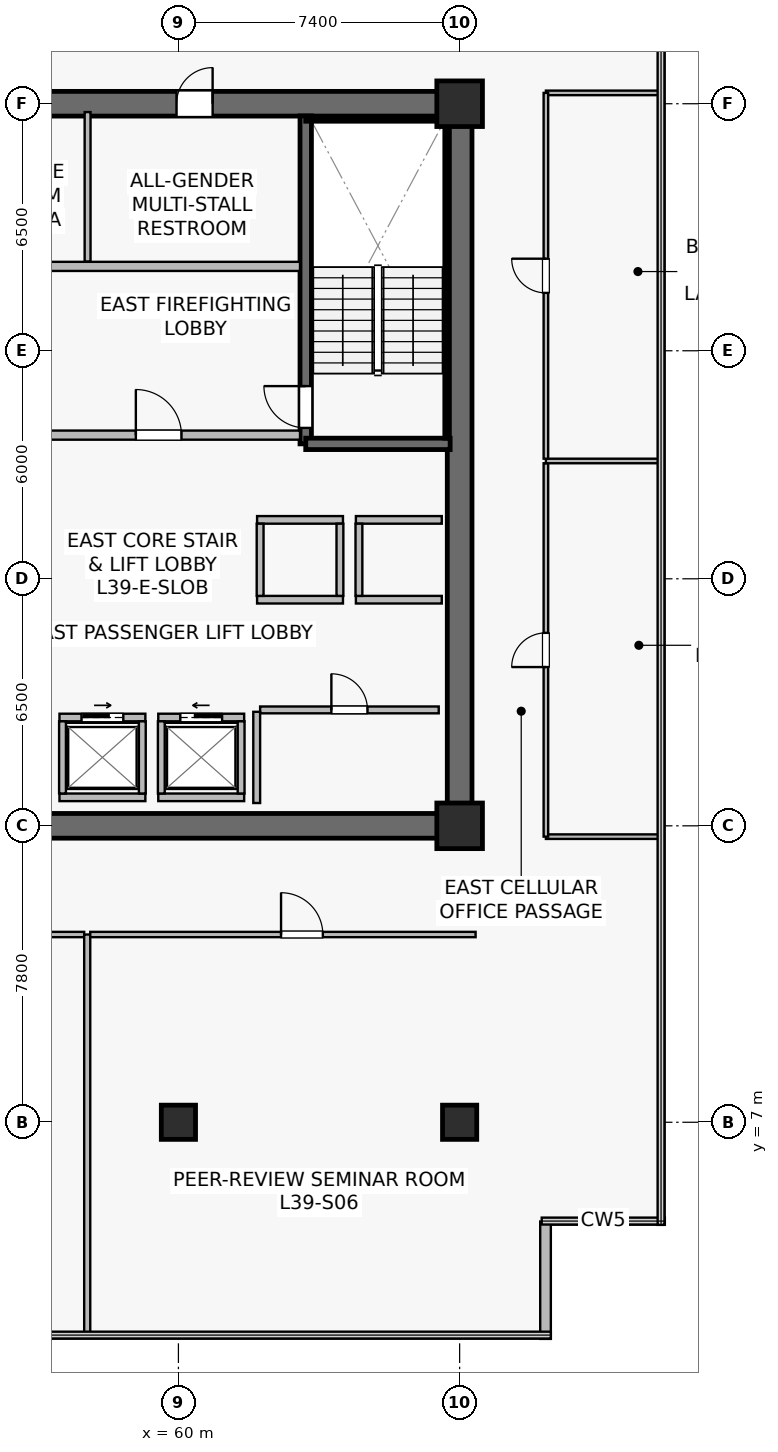
"""IFC4 building model, lengths in metres.
Left out: names, types, materials, properties, quantities, classifications, styles, units other than length and angle.
Written with IfcOpenShell. Run it as: python <this file> out.ifc"""

import sys

from ifc_helpers import new_model, si_unit, direction, frame, frame_2d, origin, origin_2d, place, context, subcontext, project, spatial, rectangle, extrude, source, transform, mapped, element, fill, save


model = new_model("IFC4")
c1 = context("Model", 3, precision=1e-05, world=origin(), true_north=direction((0.0, 1.0)))
c2 = subcontext(c1, "Body", "Model", "MODEL_VIEW")
j1 = project(units=[si_unit("LENGTHUNIT", "METRE"), si_unit("PLANEANGLEUNIT", "RADIAN")], contexts=[c1])
p1 = place(None, origin())
s1 = spatial("IfcSite", under=j1, at=p1, CompositionType="ELEMENT")
p2 = place(p1, origin())
s2 = spatial("IfcBuilding", under=s1, at=p2, CompositionType="ELEMENT")
p3 = place(p2, frame((0.0, 0.0, 162.5)))
s3 = spatial("IfcBuildingStorey", under=s2, at=p3, CompositionType="ELEMENT", Elevation=162.5)
p4 = place(p3, frame((52.275, 14.8, 0.0), z_axis=(0.0, 0.0, 1.0), x_axis=(1.0, 0.0, 0.0)))
e1 = element("IfcWall", 1, at=p4, inside=s3, PredefinedType="SHEAR", context=c2, shape_type="SweptSolid", body=[
    extrude(rectangle(XDim=15.45, YDim=0.65, at=frame_2d((7.725, 0.0))), origin(), (0.0, 0.0, 1.0), 3.79),
])
p5 = place(p3, frame((52.275, 33.8, 0.0), z_axis=(0.0, 0.0, 1.0), x_axis=(1.0, 0.0, 0.0)))
e2 = element("IfcWall", 2, at=p5, inside=s3, PredefinedType="SHEAR", context=c2, shape_type="SweptSolid", body=[
    extrude(rectangle(XDim=15.45, YDim=0.65, at=frame_2d((7.725, 0.0))), origin(), (0.0, 0.0, 1.0), 3.79),
])
p6 = place(p5, frame((7.675, 0.0, 0.0)))
e3 = element("IfcOpeningElement", 3, at=p6, cuts=e2, PredefinedType="OPENING", context=c2, shape_type="SweptSolid", body=[
    extrude(rectangle(XDim=0.95, YDim=2.15, at=frame_2d((0.475, 1.075))), frame((0.0, 0.335, 0.0), z_axis=(0.0, -1.0, 0.0), x_axis=(1.0, 0.0, 0.0)), (0.0, 0.0, 1.0), 0.67),
])
p7 = place(p5, frame((2.61, 0.0, 0.0)))
e4 = element("IfcOpeningElement", 4, at=p7, cuts=e2, PredefinedType="OPENING", context=c2, shape_type="SweptSolid", body=[
    extrude(rectangle(XDim=0.95, YDim=2.15, at=frame_2d((0.475, 1.075))), frame((0.0, 0.335, 0.0), z_axis=(0.0, -1.0, 0.0), x_axis=(1.0, 0.0, 0.0)), (0.0, 0.0, 1.0), 0.67),
])
p8 = place(p3, frame((67.4, 15.125, 0.0), z_axis=(0.0, 0.0, 1.0), x_axis=(0.0, 1.0, 0.0)))
e5 = element("IfcWall", 5, at=p8, inside=s3, PredefinedType="SHEAR", context=c2, shape_type="SweptSolid", body=[
    extrude(rectangle(XDim=18.35, YDim=0.65, at=frame_2d((9.175, 0.0))), origin(), (0.0, 0.0, 1.0), 3.79),
])
p9 = place(p3, frame((63.35, 24.85, 0.0), z_axis=(0.0, 0.0, 1.0), x_axis=(0.0, 1.0, 0.0)))
e6 = element("IfcWall", 6, at=p9, inside=s3, PredefinedType="SHEAR", context=c2, shape_type="SweptSolid", body=[
    extrude(rectangle(XDim=8.63, YDim=0.3, at=frame_2d((4.315, 0.0))), origin(), (0.0, 0.0, 1.0), 3.79),
])
p10 = place(p9, frame((0.42, 0.0, 0.0)))
e7 = element("IfcOpeningElement", 7, at=p10, cuts=e6, PredefinedType="OPENING", context=c2, shape_type="SweptSolid", body=[
    extrude(rectangle(XDim=1.1, YDim=2.15, at=frame_2d((0.55, 1.075))), frame((0.0, 0.16, 0.0), z_axis=(0.0, -1.0, 0.0), x_axis=(1.0, 0.0, 0.0)), (0.0, 0.0, 1.0), 0.32),
])
p11 = place(p3, frame((63.35, 24.85, 0.0), z_axis=(0.0, 0.0, 1.0), x_axis=(1.0, 0.0, 0.0)))
e8 = element("IfcWall", 8, at=p11, inside=s3, PredefinedType="SHEAR", context=c2, shape_type="SweptSolid", body=[
    extrude(rectangle(XDim=3.8, YDim=0.3, at=frame_2d((1.9, 0.0))), origin(), (0.0, 0.0, 1.0), 3.79),
])
p12 = place(p3, frame((63.35, 33.4, 0.0), z_axis=(0.0, 0.0, 1.0), x_axis=(1.0, 0.0, 0.0)))
e9 = element("IfcWall", 9, at=p12, inside=s3, PredefinedType="SOLIDWALL", context=c2, shape_type="SweptSolid", body=[
    extrude(rectangle(XDim=3.72, YDim=0.12, at=frame_2d((1.86, 0.0))), origin(), (0.0, 0.0, 1.0), 3.79),
])
p13 = place(p3, frame((67.07, 25.0, 0.0), z_axis=(0.0, 0.0, 1.0), x_axis=(0.0, 1.0, 0.0)))
e10 = element("IfcWall", 10, at=p13, inside=s3, PredefinedType="SOLIDWALL", context=c2, shape_type="SweptSolid", body=[
    extrude(rectangle(XDim=8.32, YDim=0.12, at=frame_2d((4.16, 0.0))), origin(), (0.0, 0.0, 1.0), 3.79),
])
m1 = source(origin(), c2, "Body", "SweptSolid", [
    extrude(rectangle(XDim=0.9, YDim=0.9, at=origin_2d()), origin(), (0.0, 0.0, 1.0), 4.1),
])
p14 = place(p3, frame((60.0, 7.0, 0.0), z_axis=(0.0, 0.0, 1.0), x_axis=(1.0, 0.0, 0.0)))
e11 = element("IfcColumn", 11, at=p14, inside=s3, PredefinedType="COLUMN", context=c2, shape_type="MappedRepresentation", body=[
    mapped(m1, transform((0.0, 0.0, 0.0), scale=1.0)),
])
m2 = source(origin(), c2, "Body", "SweptSolid", [
    extrude(rectangle(XDim=1.2, YDim=1.2, at=origin_2d()), origin(), (0.0, 0.0, 1.0), 4.1),
])
for number, where, z_axis, x_axis in (
    (12, (67.4, 14.8, 0.0), (0.0, 0.0, 1.0), (1.0, 0.0, 0.0)),
    (13, (67.4, 33.8, 0.0), (0.0, 0.0, 1.0), (1.0, 0.0, 0.0)),
):
    element("IfcColumn", number, at=place(p3, frame(where, z_axis=z_axis, x_axis=x_axis)), inside=s3, PredefinedType="COLUMN", context=c2, shape_type="MappedRepresentation", body=[
        mapped(m2, transform((0.0, 0.0, 0.0), scale=1.0)),
    ])
p15 = place(p3, frame((67.4, 7.0, 0.0), z_axis=(0.0, 0.0, 1.0), x_axis=(1.0, 0.0, 0.0)))
e14 = element("IfcColumn", 14, at=p15, inside=s3, PredefinedType="COLUMN", context=c2, shape_type="MappedRepresentation", body=[
    mapped(m1, transform((0.0, 0.0, 0.0), scale=1.0)),
])
p16 = place(p3, frame((69.66, 1.3, 0.0), z_axis=(0.0, 0.0, 1.0), x_axis=(0.0, 1.0, 0.0)))
e15 = element("IfcWall", 15, at=p16, inside=s3, PredefinedType="STANDARD", context=c2, shape_type="SweptSolid", body=[
    extrude(rectangle(XDim=3.088, YDim=0.28, at=frame_2d((1.544, 0.0))), origin(), (0.0, 0.0, 1.0), 3.79),
])
p17 = place(p3, frame((56.28, 25.08, 0.0), z_axis=(0.0, 0.0, 1.0), x_axis=(1.0, 0.0, 0.0)))
e16 = element("IfcWall", 16, at=p17, inside=s3, PredefinedType="SOLIDWALL", context=c2, shape_type="SweptSolid", body=[
    extrude(rectangle(XDim=6.92, YDim=0.24, at=frame_2d((3.46, 0.0))), origin(), (0.0, 0.0, 1.0), 3.187),
])
p18 = place(p17, frame((2.6, 0.0, 0.0)))
e17 = element("IfcOpeningElement", 17, at=p18, cuts=e16, PredefinedType="OPENING", context=c2, shape_type="SweptSolid", body=[
    extrude(rectangle(XDim=1.2, YDim=2.16, at=frame_2d((0.6, 1.08))), frame((0.0, 0.13, 0.0), z_axis=(0.0, -1.0, 0.0), x_axis=(1.0, 0.0, 0.0)), (0.0, 0.0, 1.0), 0.26),
])
p19 = place(p3, frame((56.28, 29.52, 0.0), z_axis=(0.0, 0.0, 1.0), x_axis=(1.0, 0.0, 0.0)))
e18 = element("IfcWall", 18, at=p19, inside=s3, PredefinedType="SOLIDWALL", context=c2, shape_type="SweptSolid", body=[
    extrude(rectangle(XDim=6.92, YDim=0.24, at=frame_2d((3.46, 0.0))), origin(), (0.0, 0.0, 1.0), 3.187),
])
p20 = place(p3, frame((59.47, 17.65, 0.0), z_axis=(0.0, 0.0, 1.0), x_axis=(1.0, 0.0, 0.0)))
e19 = element("IfcWall", 19, at=p20, inside=s3, PredefinedType="SOLIDWALL", context=c2, shape_type="SweptSolid", body=[
    extrude(rectangle(XDim=2.26, YDim=0.2, at=frame_2d((1.13, 0.0))), origin(), (0.0, 0.0, 1.0), 3.187),
])
p21 = place(p20, frame((0.58, 0.0, 0.0)))
e20 = element("IfcOpeningElement", 20, at=p21, cuts=e19, PredefinedType="OPENING", context=c2, shape_type="SweptSolid", body=[
    extrude(rectangle(XDim=1.1, YDim=2.22, at=frame_2d((0.55, 1.11))), frame((0.0, 0.11, 0.0), z_axis=(0.0, -1.0, 0.0), x_axis=(1.0, 0.0, 0.0)), (0.0, 0.0, 1.0), 0.22),
])
p22 = place(p3, frame((59.47, 15.55, 0.0), z_axis=(0.0, 0.0, 1.0), x_axis=(1.0, 0.0, 0.0)))
e21 = element("IfcWall", 21, at=p22, inside=s3, PredefinedType="SOLIDWALL", context=c2, shape_type="SweptSolid", body=[
    extrude(rectangle(XDim=2.26, YDim=0.2, at=frame_2d((1.13, 0.0))), origin(), (0.0, 0.0, 1.0), 3.187),
])
for number, where, z_axis, x_axis in (
    (22, (59.55, 15.65, 0.0), (0.0, 0.0, 1.0), (0.0, 1.0, 0.0)),
    (23, (61.65, 15.65, 0.0), (0.0, 0.0, 1.0), (0.0, 1.0, 0.0)),
):
    element("IfcWall", number, at=place(p3, frame(where, z_axis=z_axis, x_axis=x_axis)), inside=s3, PredefinedType="SOLIDWALL", context=c2, shape_type="SweptSolid", body=[
        extrude(rectangle(XDim=1.9, YDim=0.18, at=frame_2d((0.95, 0.0))), origin(), (0.0, 0.0, 1.0), 3.79),
    ])
p23 = place(p3, frame((56.87, 17.65, 0.0), z_axis=(0.0, 0.0, 1.0), x_axis=(1.0, 0.0, 0.0)))
e24 = element("IfcWall", 24, at=p23, inside=s3, PredefinedType="SOLIDWALL", context=c2, shape_type="SweptSolid", body=[
    extrude(rectangle(XDim=2.26, YDim=0.2, at=frame_2d((1.13, 0.0))), origin(), (0.0, 0.0, 1.0), 3.79),
])
p24 = place(p23, frame((0.58, 0.0, 0.0)))
e25 = element("IfcOpeningElement", 25, at=p24, cuts=e24, PredefinedType="OPENING", context=c2, shape_type="SweptSolid", body=[
    extrude(rectangle(XDim=1.1, YDim=2.22, at=frame_2d((0.55, 1.11))), frame((0.0, 0.11, 0.0), z_axis=(0.0, -1.0, 0.0), x_axis=(1.0, 0.0, 0.0)), (0.0, 0.0, 1.0), 0.22),
])
p25 = place(p3, frame((56.87, 15.55, 0.0), z_axis=(0.0, 0.0, 1.0), x_axis=(1.0, 0.0, 0.0)))
e26 = element("IfcWall", 26, at=p25, inside=s3, PredefinedType="SOLIDWALL", context=c2, shape_type="SweptSolid", body=[
    extrude(rectangle(XDim=2.26, YDim=0.2, at=frame_2d((1.13, 0.0))), origin(), (0.0, 0.0, 1.0), 3.79),
])
for number, where, z_axis, x_axis in (
    (27, (56.95, 15.65, 0.0), (0.0, 0.0, 1.0), (0.0, 1.0, 0.0)),
    (28, (59.05, 15.65, 0.0), (0.0, 0.0, 1.0), (0.0, 1.0, 0.0)),
):
    element("IfcWall", number, at=place(p3, frame(where, z_axis=z_axis, x_axis=x_axis)), inside=s3, PredefinedType="SOLIDWALL", context=c2, shape_type="SweptSolid", body=[
        extrude(rectangle(XDim=1.9, YDim=0.18, at=frame_2d((0.95, 0.0))), origin(), (0.0, 0.0, 1.0), 3.79),
    ])
for number, where, z_axis, x_axis in (
    (29, (64.67, 20.75, 0.0), (0.0, 0.0, 1.0), (1.0, 0.0, 0.0)),
    (30, (64.67, 22.85, 0.0), (0.0, 0.0, 1.0), (1.0, 0.0, 0.0)),
):
    element("IfcWall", number, at=place(p3, frame(where, z_axis=z_axis, x_axis=x_axis)), inside=s3, PredefinedType="SOLIDWALL", context=c2, shape_type="SweptSolid", body=[
        extrude(rectangle(XDim=2.26, YDim=0.2, at=frame_2d((1.13, 0.0))), origin(), (0.0, 0.0, 1.0), 3.79),
    ])
p26 = place(p3, frame((64.75, 20.85, 0.0), z_axis=(0.0, 0.0, 1.0), x_axis=(0.0, 1.0, 0.0)))
e31 = element("IfcWall", 31, at=p26, inside=s3, PredefinedType="SOLIDWALL", context=c2, shape_type="SweptSolid", body=[
    extrude(rectangle(XDim=1.9, YDim=0.18, at=frame_2d((0.95, 0.0))), origin(), (0.0, 0.0, 1.0), 3.79),
])
for number, where, z_axis, x_axis in (
    (32, (62.07, 20.75, 0.0), (0.0, 0.0, 1.0), (1.0, 0.0, 0.0)),
    (33, (62.07, 22.85, 0.0), (0.0, 0.0, 1.0), (1.0, 0.0, 0.0)),
):
    element("IfcWall", number, at=place(p3, frame(where, z_axis=z_axis, x_axis=x_axis)), inside=s3, PredefinedType="SOLIDWALL", context=c2, shape_type="SweptSolid", body=[
        extrude(rectangle(XDim=2.26, YDim=0.2, at=frame_2d((1.13, 0.0))), origin(), (0.0, 0.0, 1.0), 3.79),
    ])
for number, where, z_axis, x_axis in (
    (34, (62.15, 20.85, 0.0), (0.0, 0.0, 1.0), (0.0, 1.0, 0.0)),
    (35, (64.25, 20.85, 0.0), (0.0, 0.0, 1.0), (0.0, 1.0, 0.0)),
):
    element("IfcWall", number, at=place(p3, frame(where, z_axis=z_axis, x_axis=x_axis)), inside=s3, PredefinedType="SOLIDWALL", context=c2, shape_type="SweptSolid", body=[
        extrude(rectangle(XDim=1.9, YDim=0.18, at=frame_2d((0.95, 0.0))), origin(), (0.0, 0.0, 1.0), 3.79),
    ])
p27 = place(p3, frame((62.15, 17.85, 0.0), z_axis=(0.0, 0.0, 1.0), x_axis=(1.0, 0.0, 0.0)))
e36 = element("IfcWall", 36, at=p27, inside=s3, PredefinedType="SOLIDWALL", context=c2, shape_type="SweptSolid", body=[
    extrude(rectangle(XDim=4.7, YDim=0.18, at=frame_2d((2.35, 0.0))), origin(), (0.0, 0.0, 1.0), 3.79),
])
p28 = place(p27, frame((1.875, 0.0, 0.0)))
e37 = element("IfcOpeningElement", 37, at=p28, cuts=e36, PredefinedType="OPENING", context=c2, shape_type="SweptSolid", body=[
    extrude(rectangle(XDim=0.95, YDim=2.15, at=frame_2d((0.475, 1.075))), frame((0.0, 0.1, 0.0), z_axis=(0.0, -1.0, 0.0), x_axis=(1.0, 0.0, 0.0)), (0.0, 0.0, 1.0), 0.2),
])
p29 = place(p3, frame((62.06, 15.4, 0.0), z_axis=(0.0, 0.0, 1.0), x_axis=(0.0, 1.0, 0.0)))
e38 = element("IfcWall", 38, at=p29, inside=s3, PredefinedType="SOLIDWALL", context=c2, shape_type="SweptSolid", body=[
    extrude(rectangle(XDim=2.4, YDim=0.18, at=frame_2d((1.2, 0.0))), origin(), (0.0, 0.0, 1.0), 3.79),
])
p30 = place(p3, frame((57.61, 29.65, 0.0), z_axis=(0.0, 0.0, 1.0), x_axis=(0.0, 1.0, 0.0)))
e39 = element("IfcWall", 39, at=p30, inside=s3, PredefinedType="PLUMBINGWALL", context=c2, shape_type="SweptSolid", body=[
    extrude(rectangle(XDim=3.93, YDim=0.155, at=frame_2d((1.965, 0.0))), origin(), (0.0, 0.0, 1.0), 3.79),
])
p31 = place(p3, frame((45.48, 11.94, 0.0), z_axis=(0.0, 0.0, 1.0), x_axis=(1.0, 0.0, 0.0)))
e40 = element("IfcWall", 40, at=p31, inside=s3, PredefinedType="PARTITIONING", context=c2, shape_type="SweptSolid", body=[
    extrude(rectangle(XDim=12.04, YDim=0.14, at=frame_2d((6.02, 0.0))), origin(), (0.0, 0.0, 1.0), 3.187),
])
p32 = place(p31, frame((4.856, 0.0, 0.0)))
e41 = element("IfcOpeningElement", 41, at=p32, cuts=e40, PredefinedType="OPENING", context=c2, shape_type="SweptSolid", body=[
    extrude(rectangle(XDim=1.1, YDim=2.18, at=frame_2d((0.55, 1.09))), frame((0.0, 0.08, 0.0), z_axis=(0.0, -1.0, 0.0), x_axis=(1.0, 0.0, 0.0)), (0.0, 0.0, 1.0), 0.16),
])
p33 = place(p3, frame((57.6, 1.41, 0.0), z_axis=(0.0, 0.0, 1.0), x_axis=(0.0, 1.0, 0.0)))
e42 = element("IfcWall", 42, at=p33, inside=s3, PredefinedType="PARTITIONING", context=c2, shape_type="SweptSolid", body=[
    extrude(rectangle(XDim=10.53, YDim=0.16, at=frame_2d((5.265, 0.0))), origin(), (0.0, 0.0, 1.0), 3.075),
])
p34 = place(p3, frame((57.68, 11.94, 0.0), z_axis=(0.0, 0.0, 1.0), x_axis=(1.0, 0.0, 0.0)))
e43 = element("IfcWall", 43, at=p34, inside=s3, PredefinedType="PARTITIONING", context=c2, shape_type="SweptSolid", body=[
    extrude(rectangle(XDim=10.14, YDim=0.14, at=frame_2d((5.07, 0.0))), origin(), (0.0, 0.0, 1.0), 3.187),
])
p35 = place(p34, frame((5.021, 0.0, 0.0)))
e44 = element("IfcOpeningElement", 44, at=p35, cuts=e43, PredefinedType="OPENING", context=c2, shape_type="SweptSolid", body=[
    extrude(rectangle(XDim=1.1, YDim=2.18, at=frame_2d((0.55, 1.09))), frame((0.0, 0.08, 0.0), z_axis=(0.0, -1.0, 0.0), x_axis=(1.0, 0.0, 0.0)), (0.0, 0.0, 1.0), 0.16),
])
for number, where, z_axis, x_axis in (
    (45, (69.67, 14.515, 0.0), (0.0, 0.0, 1.0), (1.0, 0.0, 0.0)),
    (46, (69.67, 34.085, 0.0), (0.0, 0.0, 1.0), (1.0, 0.0, 0.0)),
):
    element("IfcWall", number, at=place(p3, frame(where, z_axis=z_axis, x_axis=x_axis)), inside=s3, PredefinedType="PARTITIONING", context=c2, shape_type="SweptSolid", body=[
        extrude(rectangle(XDim=3.02, YDim=0.12, at=frame_2d((1.51, 0.0))), origin(), (0.0, 0.0, 1.0), 3.79),
    ])
p36 = place(p3, frame((69.67, 14.515, 0.0), z_axis=(0.0, 0.0, 1.0), x_axis=(0.0, 1.0, 0.0)))
e47 = element("IfcWall", 47, at=p36, inside=s3, PredefinedType="PARTITIONING", context=c2, shape_type="SweptSolid", body=[
    extrude(rectangle(XDim=9.825, YDim=0.12, at=frame_2d((4.913, 0.0))), origin(), (0.0, 0.0, 1.0), 3.79),
])
p37 = place(p36, frame((4.462, 0.0, 0.0)))
e48 = element("IfcOpeningElement", 48, at=p37, cuts=e47, PredefinedType="OPENING", context=c2, shape_type="SweptSolid", body=[
    extrude(rectangle(XDim=0.9, YDim=2.1, at=frame_2d((0.45, 1.05))), frame((0.0, 0.07, 0.0), z_axis=(0.0, -1.0, 0.0), x_axis=(1.0, 0.0, 0.0)), (0.0, 0.0, 1.0), 0.14),
])
p38 = place(p3, frame((69.67, 24.4, 0.0), z_axis=(0.0, 0.0, 1.0), x_axis=(1.0, 0.0, 0.0)))
e49 = element("IfcWall", 49, at=p38, inside=s3, PredefinedType="PARTITIONING", context=c2, shape_type="SweptSolid", body=[
    extrude(rectangle(XDim=3.02, YDim=0.12, at=frame_2d((1.51, 0.0))), origin(), (0.0, 0.0, 1.0), 3.79),
])
p39 = place(p3, frame((69.67, 24.46, 0.0), z_axis=(0.0, 0.0, 1.0), x_axis=(0.0, 1.0, 0.0)))
e50 = element("IfcWall", 50, at=p39, inside=s3, PredefinedType="PARTITIONING", context=c2, shape_type="SweptSolid", body=[
    extrude(rectangle(XDim=9.625, YDim=0.12, at=frame_2d((4.812, 0.0))), origin(), (0.0, 0.0, 1.0), 3.79),
])
p40 = place(p39, frame((4.363, 0.0, 0.0)))
e51 = element("IfcOpeningElement", 51, at=p40, cuts=e50, PredefinedType="OPENING", context=c2, shape_type="SweptSolid", body=[
    extrude(rectangle(XDim=0.9, YDim=2.1, at=frame_2d((0.45, 1.05))), frame((0.0, 0.07, 0.0), z_axis=(0.0, -1.0, 0.0), x_axis=(1.0, 0.0, 0.0)), (0.0, 0.0, 1.0), 0.14),
])
m3 = source(origin(), c2, "Body", "SweptSolid", [
    extrude(rectangle(XDim=1.1, YDim=2.15, at=frame_2d((0.55, 1.075))), frame((0.0, 0.025, 0.0), z_axis=(0.0, -1.0, 0.0), x_axis=(1.0, 0.0, 0.0)), (0.0, 0.0, 1.0), 0.05),
])
p41 = place(p10, origin())
e52 = element("IfcDoor", 52, at=p41, inside=s3, OperationType="SINGLE_SWING_RIGHT", PredefinedType="DOOR", context=c2, shape_type="MappedRepresentation", body=[
    mapped(m3, transform((0.0, 0.0, 0.0), scale=1.0)),
])
fill(e7, e52)
m4 = source(origin(), c2, "Body", "SweptSolid", [
    extrude(rectangle(XDim=1.2, YDim=2.16, at=frame_2d((0.6, 1.08))), frame((0.0, 0.025, 0.0), z_axis=(0.0, -1.0, 0.0), x_axis=(1.0, 0.0, 0.0)), (0.0, 0.0, 1.0), 0.05),
])
p42 = place(p18, origin())
e53 = element("IfcDoor", 53, at=p42, inside=s3, OperationType="SINGLE_SWING_LEFT", PredefinedType="DOOR", context=c2, shape_type="MappedRepresentation", body=[
    mapped(m4, transform((0.0, 0.0, 0.0), scale=1.0)),
])
fill(e17, e53)
m5 = source(origin(), c2, "Body", "SweptSolid", [
    extrude(rectangle(XDim=1.1, YDim=2.22, at=frame_2d((0.55, 1.11))), frame((0.0, 0.025, 0.0), z_axis=(0.0, -1.0, 0.0), x_axis=(1.0, 0.0, 0.0)), (0.0, 0.0, 1.0), 0.05),
])
p43 = place(p21, origin())
e54 = element("IfcDoor", 54, at=p43, inside=s3, OperationType="SLIDING_TO_LEFT", PredefinedType="USERDEFINED", context=c2, shape_type="MappedRepresentation", body=[
    mapped(m5, transform((0.0, 0.0, 0.0), scale=1.0)),
])
fill(e20, e54)
p44 = place(p24, origin())
e55 = element("IfcDoor", 55, at=p44, inside=s3, OperationType="SLIDING_TO_RIGHT", PredefinedType="USERDEFINED", context=c2, shape_type="MappedRepresentation", body=[
    mapped(m5, transform((0.0, 0.0, 0.0), scale=1.0)),
])
fill(e25, e55)
m6 = source(origin(), c2, "Body", "SweptSolid", [
    extrude(rectangle(XDim=0.95, YDim=2.15, at=frame_2d((0.475, 1.075))), frame((0.0, 0.025, 0.0), z_axis=(0.0, -1.0, 0.0), x_axis=(1.0, 0.0, 0.0)), (0.0, 0.0, 1.0), 0.05),
])
p45 = place(p28, origin())
e56 = element("IfcDoor", 56, at=p45, inside=s3, OperationType="SINGLE_SWING_LEFT", PredefinedType="DOOR", context=c2, shape_type="MappedRepresentation", body=[
    mapped(m6, transform((0.0, 0.0, 0.0), scale=1.0)),
])
fill(e37, e56)
p46 = place(p6, origin())
e57 = element("IfcDoor", 57, at=p46, inside=s3, OperationType="SINGLE_SWING_RIGHT", PredefinedType="DOOR", context=c2, shape_type="MappedRepresentation", body=[
    mapped(m6, transform((0.0, 0.0, 0.0), scale=1.0)),
])
fill(e3, e57)
m7 = source(origin(), c2, "Body", "SweptSolid", [
    extrude(rectangle(XDim=1.1, YDim=2.18, at=frame_2d((0.55, 1.09))), frame((0.0, 0.025, 0.0), z_axis=(0.0, -1.0, 0.0), x_axis=(1.0, 0.0, 0.0)), (0.0, 0.0, 1.0), 0.05),
])
p47 = place(p35, origin())
e58 = element("IfcDoor", 58, at=p47, inside=s3, OperationType="SINGLE_SWING_LEFT", PredefinedType="DOOR", context=c2, shape_type="MappedRepresentation", body=[
    mapped(m7, transform((0.0, 0.0, 0.0), scale=1.0)),
])
fill(e44, e58)
m8 = source(origin(), c2, "Body", "SweptSolid", [
    extrude(rectangle(XDim=0.9, YDim=2.1, at=frame_2d((0.45, 1.05))), frame((0.0, 0.025, 0.0), z_axis=(0.0, -1.0, 0.0), x_axis=(1.0, 0.0, 0.0)), (0.0, 0.0, 1.0), 0.05),
])
p48 = place(p37, origin())
e59 = element("IfcDoor", 59, at=p48, inside=s3, OperationType="SINGLE_SWING_LEFT", PredefinedType="DOOR", context=c2, shape_type="MappedRepresentation", body=[
    mapped(m8, transform((0.0, 0.0, 0.0), scale=1.0)),
])
fill(e48, e59)
p49 = place(p40, origin())
e60 = element("IfcDoor", 60, at=p49, inside=s3, OperationType="SINGLE_SWING_RIGHT", PredefinedType="DOOR", context=c2, shape_type="MappedRepresentation", body=[
    mapped(m8, transform((0.0, 0.0, 0.0), scale=1.0)),
])
fill(e51, e60)
save(model, sys.argv[1])
